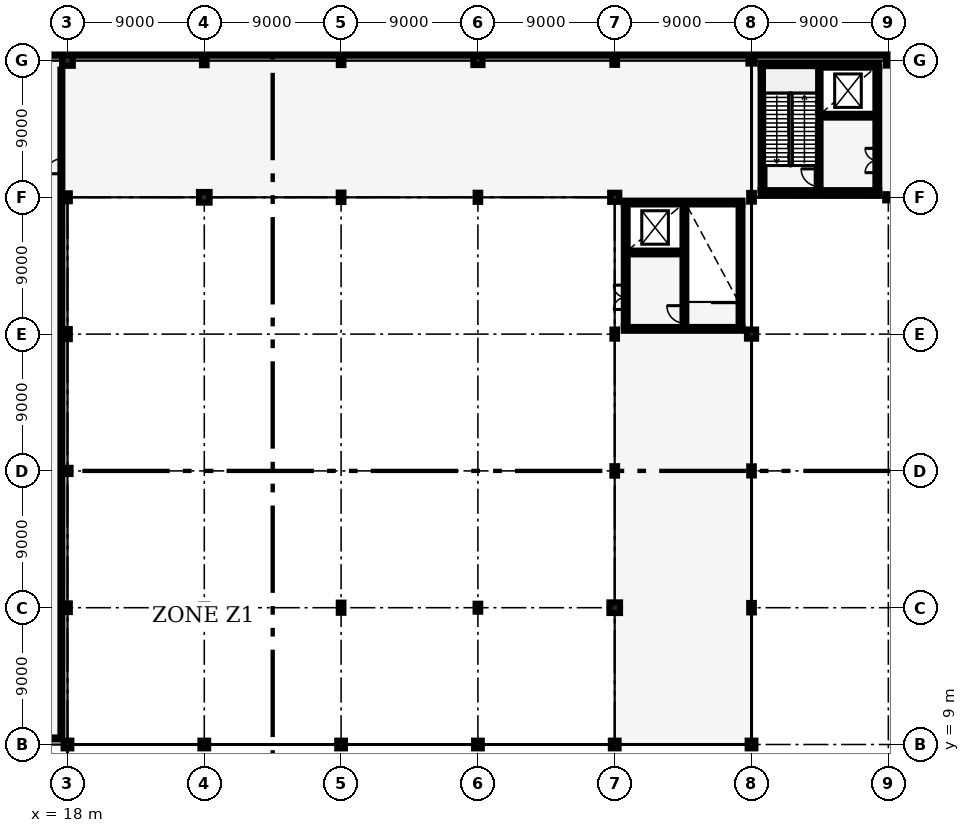
"""IFC4 building model, lengths in metres.
Left out: names, types, materials, properties, quantities, classifications, styles, units other than length and angle.
Written with IfcOpenShell. Run it as: python <this file> out.ifc"""

import sys

from ifc_helpers import new_model, si_unit, direction, frame, frame_2d, origin, origin_2d, place, context, subcontext, project, spatial, rectangle, hollow_circle, i_section, extrude, element, fill, save


model = new_model("IFC4")
c1 = context("Model", 3, precision=1e-05, world=origin(), true_north=direction((0.0, 1.0)))
c2 = subcontext(c1, "Body", "Model", "MODEL_VIEW")
j1 = project(units=[si_unit("LENGTHUNIT", "METRE"), si_unit("PLANEANGLEUNIT", "RADIAN")], contexts=[c1])
p1 = place(None, origin())
s1 = spatial("IfcSite", under=j1, at=p1, CompositionType="ELEMENT")
p2 = place(p1, origin())
s2 = spatial("IfcBuilding", under=s1, at=p2, CompositionType="ELEMENT")
p3 = place(p2, frame((0.0, 0.0, 12.0)))
s3 = spatial("IfcBuildingStorey", under=s2, at=p3, CompositionType="ELEMENT", Elevation=12.0)
p4 = place(p3, frame((18.0, 9.0, 0.0), z_axis=(0.0, 0.0, 1.0), x_axis=(1.0, 0.0, 0.0)))
e1 = element("IfcColumn", 1, at=p4, inside=s3, PredefinedType="COLUMN", context=c2, shape_type="SweptSolid", body=[
    extrude(hollow_circle(Radius=0.254, WallThickness=0.02, at=origin_2d()), origin(), (0.0, 0.0, 1.0), 6.0),
])
p5 = place(p3, frame((18.0, 18.0, 0.0), z_axis=(0.0, 0.0, 1.0), x_axis=(1.0, 0.0, 0.0)))
e2 = element("IfcColumn", 2, at=p5, inside=s3, PredefinedType="COLUMN", context=c2, shape_type="SweptSolid", body=[
    extrude(i_section(OverallWidth=0.306, OverallDepth=0.572, WebThickness=0.021, FlangeThickness=0.04, FilletRadius=0.027, at=origin_2d()), origin(), (0.0, 0.0, 1.0), 6.0),
])
p6 = place(p3, frame((18.0, 27.0, 0.0), z_axis=(0.0, 0.0, 1.0), x_axis=(1.0, 0.0, 0.0)))
e3 = element("IfcColumn", 3, at=p6, inside=s3, PredefinedType="COLUMN", context=c2, shape_type="SweptSolid", body=[
    extrude(hollow_circle(Radius=0.203, WallThickness=0.016, at=origin_2d()), origin(), (0.0, 0.0, 1.0), 6.0),
])
p7 = place(p3, frame((18.0, 36.0, 0.0), z_axis=(0.0, 0.0, 1.0), x_axis=(1.0, 0.0, 0.0)))
e4 = element("IfcColumn", 4, at=p7, inside=s3, PredefinedType="COLUMN", context=c2, shape_type="SweptSolid", body=[
    extrude(i_section(OverallWidth=0.305, OverallDepth=0.668, WebThickness=0.021, FlangeThickness=0.04, FilletRadius=0.027, at=origin_2d()), origin(), (0.0, 0.0, 1.0), 6.0),
])
p8 = place(p3, frame((18.0, 45.0, 0.0), z_axis=(0.0, 0.0, 1.0), x_axis=(1.0, 0.0, 0.0)))
e5 = element("IfcColumn", 5, at=p8, inside=s3, PredefinedType="COLUMN", context=c2, shape_type="SweptSolid", body=[
    extrude(i_section(OverallWidth=0.306, OverallDepth=0.524, WebThickness=0.021, FlangeThickness=0.04, FilletRadius=0.027, at=origin_2d()), origin(), (0.0, 0.0, 1.0), 6.0),
])
p9 = place(p3, frame((18.0, 54.0, 0.0), z_axis=(0.0, 0.0, 1.0), x_axis=(1.0, 0.0, 0.0)))
e6 = element("IfcColumn", 6, at=p9, inside=s3, PredefinedType="COLUMN", context=c2, shape_type="SweptSolid", body=[
    extrude(rectangle(XDim=0.7, YDim=0.7, at=origin_2d()), origin(), (0.0, 0.0, 1.0), 6.0),
])
p10 = place(p3, frame((27.0, 9.0, 0.0), z_axis=(0.0, 0.0, 1.0), x_axis=(1.0, 0.0, 0.0)))
e7 = element("IfcColumn", 7, at=p10, inside=s3, PredefinedType="COLUMN", context=c2, shape_type="SweptSolid", body=[
    extrude(hollow_circle(Radius=0.254, WallThickness=0.02, at=origin_2d()), origin(), (0.0, 0.0, 1.0), 6.0),
])
p11 = place(p3, frame((27.0, 18.0, 0.0), z_axis=(0.0, 0.0, 1.0), x_axis=(1.0, 0.0, 0.0)))
e8 = element("IfcColumn", 8, at=p11, inside=s3, PredefinedType="COLUMN", context=c2, shape_type="SweptSolid", body=[
    extrude(hollow_circle(Radius=0.203, WallThickness=0.016, at=origin_2d()), origin(), (0.0, 0.0, 1.0), 6.0),
])
p12 = place(p3, frame((27.0, 45.0, 0.0), z_axis=(0.0, 0.0, 1.0), x_axis=(1.0, 0.0, 0.0)))
e9 = element("IfcColumn", 9, at=p12, inside=s3, PredefinedType="COLUMN", context=c2, shape_type="SweptSolid", body=[
    extrude(rectangle(XDim=0.7, YDim=0.7, at=origin_2d()), origin(), (0.0, 0.0, 1.0), 6.0),
])
p13 = place(p3, frame((27.0, 54.0, 0.0), z_axis=(0.0, 0.0, 1.0), x_axis=(1.0, 0.0, 0.0)))
e10 = element("IfcColumn", 10, at=p13, inside=s3, PredefinedType="COLUMN", context=c2, shape_type="SweptSolid", body=[
    extrude(i_section(OverallWidth=0.305, OverallDepth=0.62, WebThickness=0.021, FlangeThickness=0.04, FilletRadius=0.027, at=origin_2d()), origin(), (0.0, 0.0, 1.0), 6.0),
])
p14 = place(p3, frame((36.0, 9.0, 0.0), z_axis=(0.0, 0.0, 1.0), x_axis=(1.0, 0.0, 0.0)))
e11 = element("IfcColumn", 11, at=p14, inside=s3, PredefinedType="COLUMN", context=c2, shape_type="SweptSolid", body=[
    extrude(hollow_circle(Radius=0.254, WallThickness=0.02, at=origin_2d()), origin(), (0.0, 0.0, 1.0), 6.0),
])
p15 = place(p3, frame((36.0, 18.0, 0.0), z_axis=(0.0, 0.0, 1.0), x_axis=(1.0, 0.0, 0.0)))
e12 = element("IfcColumn", 12, at=p15, inside=s3, PredefinedType="COLUMN", context=c2, shape_type="SweptSolid", body=[
    extrude(i_section(OverallWidth=0.305, OverallDepth=0.668, WebThickness=0.021, FlangeThickness=0.04, FilletRadius=0.027, at=origin_2d()), origin(), (0.0, 0.0, 1.0), 6.0),
])
p16 = place(p3, frame((36.0, 45.0, 0.0), z_axis=(0.0, 0.0, 1.0), x_axis=(1.0, 0.0, 0.0)))
e13 = element("IfcColumn", 13, at=p16, inside=s3, PredefinedType="COLUMN", context=c2, shape_type="SweptSolid", body=[
    extrude(i_section(OverallWidth=0.305, OverallDepth=0.62, WebThickness=0.021, FlangeThickness=0.04, FilletRadius=0.027, at=origin_2d()), origin(), (0.0, 0.0, 1.0), 6.0),
])
p17 = place(p3, frame((36.0, 54.0, 0.0), z_axis=(0.0, 0.0, 1.0), x_axis=(1.0, 0.0, 0.0)))
e14 = element("IfcColumn", 14, at=p17, inside=s3, PredefinedType="COLUMN", context=c2, shape_type="SweptSolid", body=[
    extrude(i_section(OverallWidth=0.3, OverallDepth=0.6, WebThickness=0.015, FlangeThickness=0.03, FilletRadius=0.027, at=origin_2d()), origin(), (0.0, 0.0, 1.0), 6.0),
])
p18 = place(p3, frame((45.0, 9.0, 0.0), z_axis=(0.0, 0.0, 1.0), x_axis=(1.0, 0.0, 0.0)))
e15 = element("IfcColumn", 15, at=p18, inside=s3, PredefinedType="COLUMN", context=c2, shape_type="SweptSolid", body=[
    extrude(hollow_circle(Radius=0.254, WallThickness=0.02, at=origin_2d()), origin(), (0.0, 0.0, 1.0), 6.0),
])
p19 = place(p3, frame((45.0, 18.0, 0.0), z_axis=(0.0, 0.0, 1.0), x_axis=(1.0, 0.0, 0.0)))
e16 = element("IfcColumn", 16, at=p19, inside=s3, PredefinedType="COLUMN", context=c2, shape_type="SweptSolid", body=[
    extrude(i_section(OverallWidth=0.306, OverallDepth=0.524, WebThickness=0.021, FlangeThickness=0.04, FilletRadius=0.027, at=origin_2d()), origin(), (0.0, 0.0, 1.0), 6.0),
])
p20 = place(p3, frame((45.0, 45.0, 0.0), z_axis=(0.0, 0.0, 1.0), x_axis=(1.0, 0.0, 0.0)))
e17 = element("IfcColumn", 17, at=p20, inside=s3, PredefinedType="COLUMN", context=c2, shape_type="SweptSolid", body=[
    extrude(i_section(OverallWidth=0.3, OverallDepth=0.6, WebThickness=0.015, FlangeThickness=0.03, FilletRadius=0.027, at=origin_2d()), origin(), (0.0, 0.0, 1.0), 6.0),
])
p21 = place(p3, frame((45.0, 54.0, 0.0), z_axis=(0.0, 0.0, 1.0), x_axis=(1.0, 0.0, 0.0)))
e18 = element("IfcColumn", 18, at=p21, inside=s3, PredefinedType="COLUMN", context=c2, shape_type="SweptSolid", body=[
    extrude(rectangle(XDim=0.6, YDim=0.6, at=origin_2d()), origin(), (0.0, 0.0, 1.0), 6.0),
])
p22 = place(p3, frame((54.0, 9.0, 0.0), z_axis=(0.0, 0.0, 1.0), x_axis=(1.0, 0.0, 0.0)))
e19 = element("IfcColumn", 19, at=p22, inside=s3, PredefinedType="COLUMN", context=c2, shape_type="SweptSolid", body=[
    extrude(hollow_circle(Radius=0.254, WallThickness=0.02, at=origin_2d()), origin(), (0.0, 0.0, 1.0), 6.0),
])
p23 = place(p3, frame((54.0, 18.0, 0.0), z_axis=(0.0, 0.0, 1.0), x_axis=(1.0, 0.0, 0.0)))
e20 = element("IfcColumn", 20, at=p23, inside=s3, PredefinedType="COLUMN", context=c2, shape_type="SweptSolid", body=[
    extrude(rectangle(XDim=0.7, YDim=0.7, at=origin_2d()), origin(), (0.0, 0.0, 1.0), 6.0),
])
p24 = place(p3, frame((54.0, 27.0, 0.0), z_axis=(0.0, 0.0, 1.0), x_axis=(1.0, 0.0, 0.0)))
e21 = element("IfcColumn", 21, at=p24, inside=s3, PredefinedType="COLUMN", context=c2, shape_type="SweptSolid", body=[
    extrude(i_section(OverallWidth=0.305, OverallDepth=0.62, WebThickness=0.021, FlangeThickness=0.04, FilletRadius=0.027, at=origin_2d()), origin(), (0.0, 0.0, 1.0), 6.0),
])
p25 = place(p3, frame((54.0, 36.0, 0.0), z_axis=(0.0, 0.0, 1.0), x_axis=(1.0, 0.0, 0.0)))
e22 = element("IfcColumn", 22, at=p25, inside=s3, PredefinedType="COLUMN", context=c2, shape_type="SweptSolid", body=[
    extrude(i_section(OverallWidth=0.3, OverallDepth=0.6, WebThickness=0.015, FlangeThickness=0.03, FilletRadius=0.027, at=origin_2d()), origin(), (0.0, 0.0, 1.0), 6.0),
])
p26 = place(p3, frame((54.0, 45.0, 0.0), z_axis=(0.0, 0.0, 1.0), x_axis=(1.0, 0.0, 0.0)))
e23 = element("IfcColumn", 23, at=p26, inside=s3, PredefinedType="COLUMN", context=c2, shape_type="SweptSolid", body=[
    extrude(rectangle(XDim=0.6, YDim=0.6, at=origin_2d()), origin(), (0.0, 0.0, 1.0), 6.0),
])
p27 = place(p3, frame((54.0, 54.0, 0.0), z_axis=(0.0, 0.0, 1.0), x_axis=(1.0, 0.0, 0.0)))
e24 = element("IfcColumn", 24, at=p27, inside=s3, PredefinedType="COLUMN", context=c2, shape_type="SweptSolid", body=[
    extrude(i_section(OverallWidth=0.306, OverallDepth=0.572, WebThickness=0.021, FlangeThickness=0.04, FilletRadius=0.027, at=origin_2d()), origin(), (0.0, 0.0, 1.0), 6.0),
])
p28 = place(p3, frame((63.0, 9.0, 0.0), z_axis=(0.0, 0.0, 1.0), x_axis=(1.0, 0.0, 0.0)))
e25 = element("IfcColumn", 25, at=p28, inside=s3, PredefinedType="COLUMN", context=c2, shape_type="SweptSolid", body=[
    extrude(hollow_circle(Radius=0.254, WallThickness=0.02, at=origin_2d()), origin(), (0.0, 0.0, 1.0), 6.0),
])
p29 = place(p3, frame((63.0, 18.0, 0.0), z_axis=(0.0, 0.0, 1.0), x_axis=(1.0, 0.0, 0.0)))
e26 = element("IfcColumn", 26, at=p29, inside=s3, PredefinedType="COLUMN", context=c2, shape_type="SweptSolid", body=[
    extrude(i_section(OverallWidth=0.305, OverallDepth=0.62, WebThickness=0.021, FlangeThickness=0.04, FilletRadius=0.027, at=origin_2d()), origin(), (0.0, 0.0, 1.0), 6.0),
])
p30 = place(p3, frame((63.0, 27.0, 0.0), z_axis=(0.0, 0.0, 1.0), x_axis=(1.0, 0.0, 0.0)))
e27 = element("IfcColumn", 27, at=p30, inside=s3, PredefinedType="COLUMN", context=c2, shape_type="SweptSolid", body=[
    extrude(i_section(OverallWidth=0.3, OverallDepth=0.6, WebThickness=0.015, FlangeThickness=0.03, FilletRadius=0.027, at=origin_2d()), origin(), (0.0, 0.0, 1.0), 6.0),
])
p31 = place(p3, frame((63.0, 36.0, 0.0), z_axis=(0.0, 0.0, 1.0), x_axis=(1.0, 0.0, 0.0)))
e28 = element("IfcColumn", 28, at=p31, inside=s3, PredefinedType="COLUMN", context=c2, shape_type="SweptSolid", body=[
    extrude(rectangle(XDim=0.6, YDim=0.6, at=origin_2d()), origin(), (0.0, 0.0, 1.0), 6.0),
])
p32 = place(p3, frame((63.0, 45.0, 0.0), z_axis=(0.0, 0.0, 1.0), x_axis=(1.0, 0.0, 0.0)))
e29 = element("IfcColumn", 29, at=p32, inside=s3, PredefinedType="COLUMN", context=c2, shape_type="SweptSolid", body=[
    extrude(i_section(OverallWidth=0.306, OverallDepth=0.572, WebThickness=0.021, FlangeThickness=0.04, FilletRadius=0.027, at=origin_2d()), origin(), (0.0, 0.0, 1.0), 6.0),
])
for number, where, z_axis, x_axis in (
    (30, (63.0, 54.0, 0.0), (0.0, 0.0, 1.0), (1.0, 0.0, 0.0)),
    (31, (72.0, 45.0, 0.0), (0.0, 0.0, 1.0), (1.0, 0.0, 0.0)),
):
    element("IfcColumn", number, at=place(p3, frame(where, z_axis=z_axis, x_axis=x_axis)), inside=s3, PredefinedType="COLUMN", context=c2, shape_type="SweptSolid", body=[
        extrude(hollow_circle(Radius=0.203, WallThickness=0.016, at=origin_2d()), origin(), (0.0, 0.0, 1.0), 6.0),
    ])
p33 = place(p3, frame((72.0, 54.0, 0.0), z_axis=(0.0, 0.0, 1.0), x_axis=(1.0, 0.0, 0.0)))
e32 = element("IfcColumn", 32, at=p33, inside=s3, PredefinedType="COLUMN", context=c2, shape_type="SweptSolid", body=[
    extrude(i_section(OverallWidth=0.305, OverallDepth=0.668, WebThickness=0.021, FlangeThickness=0.04, FilletRadius=0.027, at=origin_2d()), origin(), (0.0, 0.0, 1.0), 6.0),
])
p34 = place(p3, frame((54.725, 36.47, 0.0), z_axis=(0.0, 0.0, 1.0), x_axis=(0.0, 1.0, 0.0)))
e33 = element("IfcWall", 33, at=p34, inside=s3, PredefinedType="SHEAR", context=c2, shape_type="SweptSolid", body=[
    extrude(rectangle(XDim=8.06, YDim=0.25, at=frame_2d((4.03, 0.0))), origin(), (0.0, 0.0, 1.0), 5.64),
])
p35 = place(p34, frame((1.15, 0.0, 0.0)))
e34 = element("IfcOpeningElement", 34, at=p35, cuts=e33, PredefinedType="OPENING", context=c2, shape_type="SweptSolid", body=[
    extrude(rectangle(XDim=1.6, YDim=2.2, at=frame_2d((0.8, 1.1))), frame((0.0, 0.135, 0.0), z_axis=(0.0, -1.0, 0.0), x_axis=(1.0, 0.0, 0.0)), (0.0, 0.0, 1.0), 0.27),
])
p36 = place(p3, frame((62.275, 36.47, 0.0), z_axis=(0.0, 0.0, 1.0), x_axis=(0.0, 1.0, 0.0)))
e35 = element("IfcWall", 35, at=p36, inside=s3, PredefinedType="SHEAR", context=c2, shape_type="SweptSolid", body=[
    extrude(rectangle(XDim=8.06, YDim=0.25, at=frame_2d((4.03, 0.0))), origin(), (0.0, 0.0, 1.0), 5.64),
])
for number, where, z_axis, x_axis in (
    (36, (54.6, 36.345, 0.0), (0.0, 0.0, 1.0), (1.0, 0.0, 0.0)),
    (37, (54.6, 44.655, 0.0), (0.0, 0.0, 1.0), (1.0, 0.0, 0.0)),
):
    element("IfcWall", number, at=place(p3, frame(where, z_axis=z_axis, x_axis=x_axis)), inside=s3, PredefinedType="SHEAR", context=c2, shape_type="SweptSolid", body=[
        extrude(rectangle(XDim=7.8, YDim=0.25, at=frame_2d((3.9, 0.0))), origin(), (0.0, 0.0, 1.0), 5.64),
    ])
p37 = place(p3, frame((58.585, 36.47, 0.0), z_axis=(0.0, 0.0, 1.0), x_axis=(0.0, 1.0, 0.0)))
e38 = element("IfcWall", 38, at=p37, inside=s3, PredefinedType="SHEAR", context=c2, shape_type="SweptSolid", body=[
    extrude(rectangle(XDim=8.06, YDim=0.25, at=frame_2d((4.03, 0.0))), origin(), (0.0, 0.0, 1.0), 5.64),
])
p38 = place(p37, frame((0.25, 0.0, 0.0)))
e39 = element("IfcOpeningElement", 39, at=p38, cuts=e38, PredefinedType="OPENING", context=c2, shape_type="SweptSolid", body=[
    extrude(rectangle(XDim=1.15, YDim=2.15, at=frame_2d((0.575, 1.075))), frame((0.0, 0.135, 0.0), z_axis=(0.0, -1.0, 0.0), x_axis=(1.0, 0.0, 0.0)), (0.0, 0.0, 1.0), 0.27),
])
p39 = place(p3, frame((54.85, 41.37, 0.0), z_axis=(0.0, 0.0, 1.0), x_axis=(1.0, 0.0, 0.0)))
e40 = element("IfcWall", 40, at=p39, inside=s3, PredefinedType="SHEAR", context=c2, shape_type="SweptSolid", body=[
    extrude(rectangle(XDim=3.61, YDim=0.25, at=frame_2d((1.805, 0.0))), origin(), (0.0, 0.0, 1.0), 5.64),
])
p40 = place(p39, frame((0.95, 0.0, 0.0)))
e41 = element("IfcOpeningElement", 41, at=p40, cuts=e40, PredefinedType="OPENING", context=c2, shape_type="SweptSolid", body=[
    extrude(rectangle(XDim=1.2, YDim=2.2, at=frame_2d((0.6, 1.1))), frame((0.0, 0.135, 0.0), z_axis=(0.0, -1.0, 0.0), x_axis=(1.0, 0.0, 0.0)), (0.0, 0.0, 1.0), 0.27),
])
p41 = place(p3, frame((63.725, 45.47, 0.0), z_axis=(0.0, 0.0, 1.0), x_axis=(0.0, 1.0, 0.0)))
e42 = element("IfcWall", 42, at=p41, inside=s3, PredefinedType="SHEAR", context=c2, shape_type="SweptSolid", body=[
    extrude(rectangle(XDim=8.06, YDim=0.25, at=frame_2d((4.03, 0.0))), origin(), (0.0, 0.0, 1.0), 5.7),
])
p42 = place(p3, frame((71.275, 45.47, 0.0), z_axis=(0.0, 0.0, 1.0), x_axis=(0.0, 1.0, 0.0)))
e43 = element("IfcWall", 43, at=p42, inside=s3, PredefinedType="SHEAR", context=c2, shape_type="SweptSolid", body=[
    extrude(rectangle(XDim=8.06, YDim=0.25, at=frame_2d((4.03, 0.0))), origin(), (0.0, 0.0, 1.0), 5.7),
])
p43 = place(p42, frame((1.15, 0.0, 0.0)))
e44 = element("IfcOpeningElement", 44, at=p43, cuts=e43, PredefinedType="OPENING", context=c2, shape_type="SweptSolid", body=[
    extrude(rectangle(XDim=1.6, YDim=2.2, at=frame_2d((0.8, 1.1))), frame((0.0, 0.135, 0.0), z_axis=(0.0, -1.0, 0.0), x_axis=(1.0, 0.0, 0.0)), (0.0, 0.0, 1.0), 0.27),
])
for number, where, z_axis, x_axis in (
    (45, (63.6, 45.345, 0.0), (0.0, 0.0, 1.0), (1.0, 0.0, 0.0)),
    (46, (63.6, 53.655, 0.0), (0.0, 0.0, 1.0), (1.0, 0.0, 0.0)),
):
    element("IfcWall", number, at=place(p3, frame(where, z_axis=z_axis, x_axis=x_axis)), inside=s3, PredefinedType="SHEAR", context=c2, shape_type="SweptSolid", body=[
        extrude(rectangle(XDim=7.8, YDim=0.25, at=frame_2d((3.9, 0.0))), origin(), (0.0, 0.0, 1.0), 5.7),
    ])
p44 = place(p3, frame((67.415, 45.47, 0.0), z_axis=(0.0, 0.0, 1.0), x_axis=(0.0, 1.0, 0.0)))
e47 = element("IfcWall", 47, at=p44, inside=s3, PredefinedType="SHEAR", context=c2, shape_type="SweptSolid", body=[
    extrude(rectangle(XDim=8.06, YDim=0.25, at=frame_2d((4.03, 0.0))), origin(), (0.0, 0.0, 1.0), 5.7),
])
p45 = place(p44, frame((0.25, 0.0, 0.0)))
e48 = element("IfcOpeningElement", 48, at=p45, cuts=e47, PredefinedType="OPENING", context=c2, shape_type="SweptSolid", body=[
    extrude(rectangle(XDim=1.15, YDim=2.15, at=frame_2d((0.575, 1.075))), frame((0.0, 0.135, 0.0), z_axis=(0.0, -1.0, 0.0), x_axis=(1.0, 0.0, 0.0)), (0.0, 0.0, 1.0), 0.27),
])
p46 = place(p3, frame((67.54, 50.37, 0.0), z_axis=(0.0, 0.0, 1.0), x_axis=(1.0, 0.0, 0.0)))
e49 = element("IfcWall", 49, at=p46, inside=s3, PredefinedType="SHEAR", context=c2, shape_type="SweptSolid", body=[
    extrude(rectangle(XDim=3.61, YDim=0.25, at=frame_2d((1.805, 0.0))), origin(), (0.0, 0.0, 1.0), 5.7),
])
p47 = place(p46, frame((0.95, 0.0, 0.0)))
e50 = element("IfcOpeningElement", 50, at=p47, cuts=e49, PredefinedType="OPENING", context=c2, shape_type="SweptSolid", body=[
    extrude(rectangle(XDim=1.2, YDim=2.2, at=frame_2d((0.6, 1.1))), frame((0.0, 0.135, 0.0), z_axis=(0.0, -1.0, 0.0), x_axis=(1.0, 0.0, 0.0)), (0.0, 0.0, 1.0), 0.27),
])
p48 = place(p3, frame((0.6, 54.4, 0.0), z_axis=(0.0, 0.0, 1.0), x_axis=(1.0, 0.0, 0.0)))
e51 = element("IfcWall", 51, at=p48, inside=s3, PredefinedType="PARTITIONING", context=c2, shape_type="SweptSolid", body=[
    extrude(rectangle(XDim=124.8, YDim=0.17, at=frame_2d((62.4, 0.0))), origin(), (0.0, 0.0, 1.0), 4.75),
])
p49 = place(p48, frame((0.85, 0.0, 0.0)))
e52 = element("IfcOpeningElement", 52, at=p49, cuts=e51, PredefinedType="OPENING", context=c2, shape_type="SweptSolid", body=[
    extrude(rectangle(XDim=1.02, YDim=2.15, at=frame_2d((0.51, 1.075))), frame((0.0, 0.095, 0.0), z_axis=(0.0, -1.0, 0.0), x_axis=(1.0, 0.0, 0.0)), (0.0, 0.0, 1.0), 0.19),
])
p50 = place(p3, frame((17.6, 9.4, 0.0), z_axis=(0.0, 0.0, 1.0), x_axis=(0.0, 1.0, 0.0)))
e53 = element("IfcWall", 53, at=p50, inside=s3, PredefinedType="PARTITIONING", context=c2, shape_type="SweptSolid", body=[
    extrude(rectangle(XDim=44.0, YDim=0.125, at=frame_2d((22.0, 0.0))), origin(), (0.0, 0.0, 1.0), 4.75),
])
p51 = place(p50, frame((37.15, 0.0, 0.0)))
e54 = element("IfcOpeningElement", 54, at=p51, cuts=e53, PredefinedType="OPENING", context=c2, shape_type="SweptSolid", body=[
    extrude(rectangle(XDim=0.98, YDim=2.12, at=frame_2d((0.49, 1.06))), frame((0.0, 0.073, 0.0), z_axis=(0.0, -1.0, 0.0), x_axis=(1.0, 0.0, 0.0)), (0.0, 0.0, 1.0), 0.145),
])
p52 = place(p3, frame((0.675, 9.4, 0.0), z_axis=(0.0, 0.0, 1.0), x_axis=(1.0, 0.0, 0.0)))
e55 = element("IfcWall", 55, at=p52, inside=s3, PredefinedType="PARTITIONING", context=c2, shape_type="SweptSolid", body=[
    extrude(rectangle(XDim=16.85, YDim=0.125, at=frame_2d((8.425, 0.0))), origin(), (0.0, 0.0, 1.0), 4.75),
])
p53 = place(p38, origin())
e56 = element("IfcDoor", 56, at=p53, inside=s3, OperationType="SINGLE_SWING_RIGHT", PredefinedType="DOOR", context=c2, shape_type="SweptSolid", body=[
    extrude(rectangle(XDim=1.15, YDim=2.15, at=frame_2d((0.575, 1.075))), frame((0.0, 0.025, 0.0), z_axis=(0.0, -1.0, 0.0), x_axis=(1.0, 0.0, 0.0)), (0.0, 0.0, 1.0), 0.05),
])
fill(e39, e56)
p54 = place(p40, origin())
e57 = element("IfcDoor", 57, at=p54, inside=s3, OperationType="DOUBLE_DOOR_SLIDING", PredefinedType="DOOR", context=c2, shape_type="SweptSolid", body=[
    extrude(rectangle(XDim=1.2, YDim=2.2, at=frame_2d((0.6, 1.1))), frame((0.0, 0.025, 0.0), z_axis=(0.0, -1.0, 0.0), x_axis=(1.0, 0.0, 0.0)), (0.0, 0.0, 1.0), 0.05),
])
fill(e41, e57)
p55 = place(p35, origin())
e58 = element("IfcDoor", 58, at=p55, inside=s3, OperationType="DOUBLE_DOOR_SINGLE_SWING", PredefinedType="DOOR", context=c2, shape_type="SweptSolid", body=[
    extrude(rectangle(XDim=1.6, YDim=2.2, at=frame_2d((0.8, 1.1))), frame((0.0, 0.025, 0.0), z_axis=(0.0, -1.0, 0.0), x_axis=(1.0, 0.0, 0.0)), (0.0, 0.0, 1.0), 0.05),
])
fill(e34, e58)
p56 = place(p45, origin())
e59 = element("IfcDoor", 59, at=p56, inside=s3, OperationType="SINGLE_SWING_RIGHT", PredefinedType="DOOR", context=c2, shape_type="SweptSolid", body=[
    extrude(rectangle(XDim=1.15, YDim=2.15, at=frame_2d((0.575, 1.075))), frame((0.0, 0.025, 0.0), z_axis=(0.0, -1.0, 0.0), x_axis=(1.0, 0.0, 0.0)), (0.0, 0.0, 1.0), 0.05),
])
fill(e48, e59)
p57 = place(p47, origin())
e60 = element("IfcDoor", 60, at=p57, inside=s3, OperationType="DOUBLE_DOOR_SLIDING", PredefinedType="DOOR", context=c2, shape_type="SweptSolid", body=[
    extrude(rectangle(XDim=1.2, YDim=2.2, at=frame_2d((0.6, 1.1))), frame((0.0, 0.025, 0.0), z_axis=(0.0, -1.0, 0.0), x_axis=(1.0, 0.0, 0.0)), (0.0, 0.0, 1.0), 0.05),
])
fill(e50, e60)
p58 = place(p43, origin())
e61 = element("IfcDoor", 61, at=p58, inside=s3, OperationType="DOUBLE_DOOR_SINGLE_SWING", PredefinedType="DOOR", context=c2, shape_type="SweptSolid", body=[
    extrude(rectangle(XDim=1.6, YDim=2.2, at=frame_2d((0.8, 1.1))), frame((0.0, 0.025, 0.0), z_axis=(0.0, -1.0, 0.0), x_axis=(1.0, 0.0, 0.0)), (0.0, 0.0, 1.0), 0.05),
])
fill(e44, e61)
p59 = place(p51, origin())
e62 = element("IfcDoor", 62, at=p59, inside=s3, OperationType="SINGLE_SWING_LEFT", PredefinedType="DOOR", context=c2, shape_type="SweptSolid", body=[
    extrude(rectangle(XDim=0.98, YDim=2.12, at=frame_2d((0.49, 1.06))), frame((0.0, 0.025, 0.0), z_axis=(0.0, -1.0, 0.0), x_axis=(1.0, 0.0, 0.0)), (0.0, 0.0, 1.0), 0.05),
])
fill(e54, e62)
save(model, sys.argv[1])
